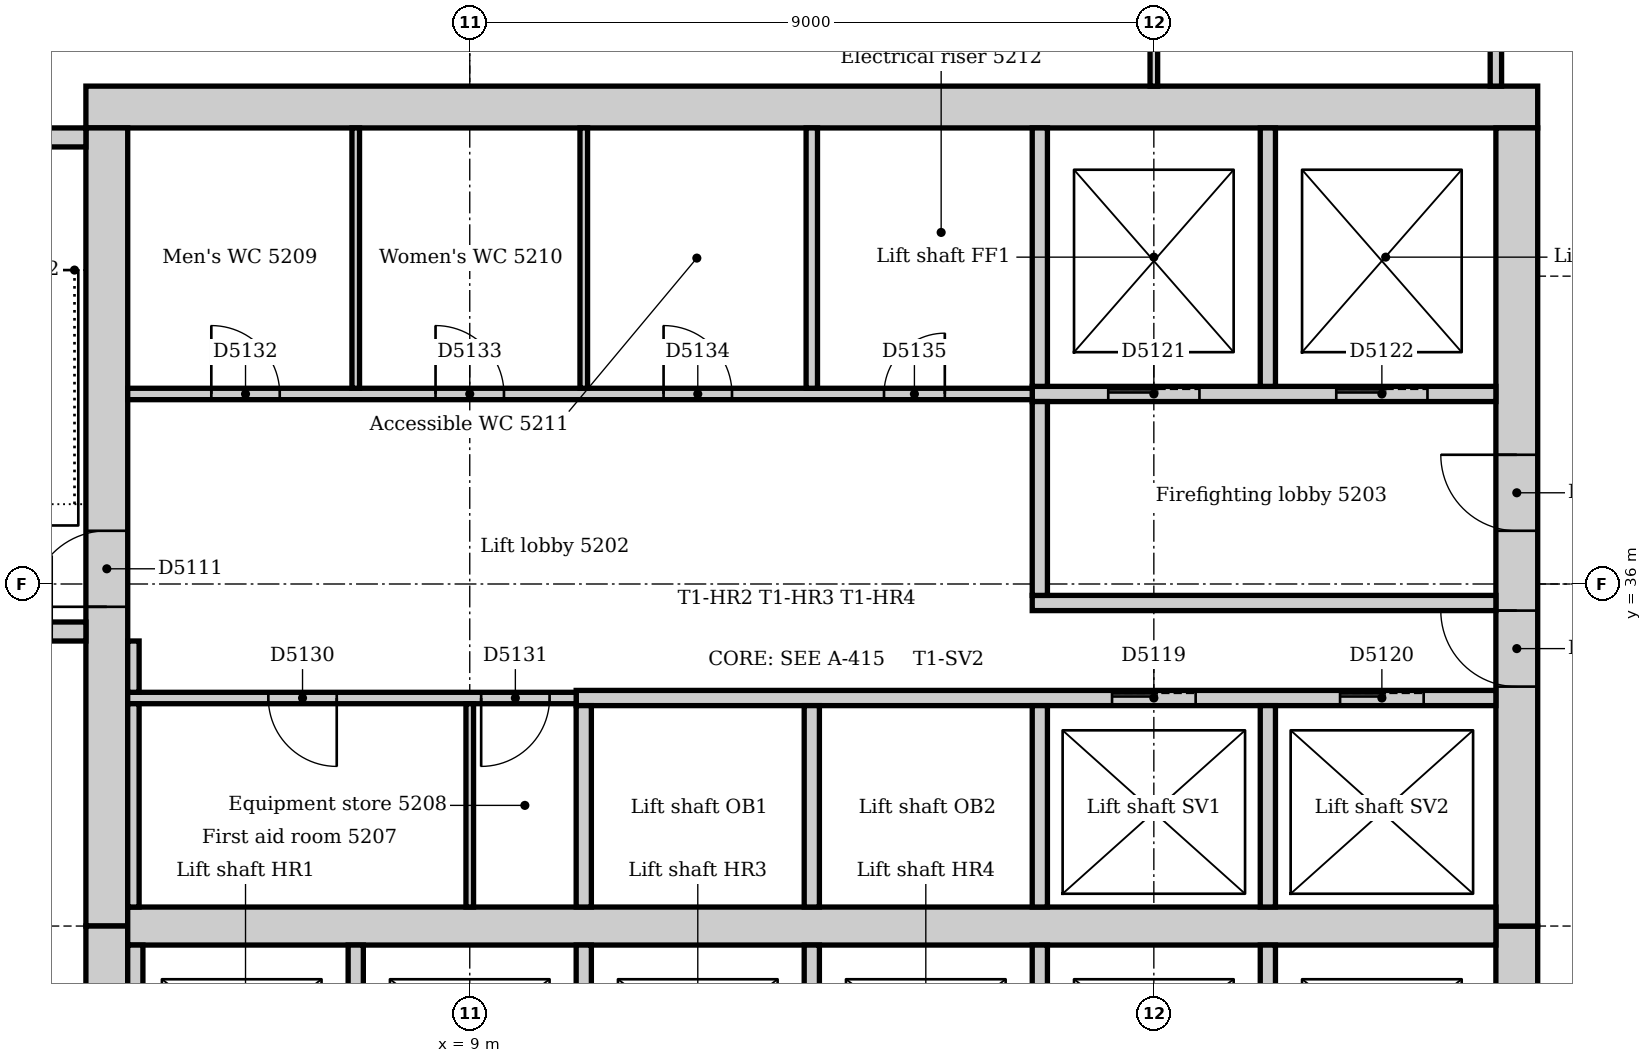
"""IFC4 building model, lengths in metres.
Left out: names, types, materials, properties, quantities, classifications, styles, units other than length and angle.
Written with IfcOpenShell. Run it as: python <this file> out.ifc"""

import sys

from ifc_helpers import new_model, si_unit, direction, frame, frame_2d, origin, place, context, subcontext, project, spatial, rectangle, extrude, element, fill, save


model = new_model("IFC4")
c1 = context("Model", 3, precision=1e-05, world=origin(), true_north=direction((0.0, 1.0)))
c2 = subcontext(c1, "Body", "Model", "MODEL_VIEW")
j1 = project(units=[si_unit("LENGTHUNIT", "METRE"), si_unit("PLANEANGLEUNIT", "RADIAN")], contexts=[c1])
p1 = place(None, origin())
s1 = spatial("IfcSite", under=j1, at=p1, CompositionType="ELEMENT")
p2 = place(p1, origin())
s2 = spatial("IfcBuilding", under=s1, at=p2, CompositionType="ELEMENT")
p3 = place(p2, frame((0.0, 0.0, 218.0)))
s3 = spatial("IfcBuildingStorey", under=s2, at=p3, CompositionType="ELEMENT", Elevation=218.0)
p4 = place(p3, frame((23.05, 42.275, 0.0), z_axis=(0.0, 0.0, 1.0), x_axis=(-1.0, 0.0, 0.0)))
e1 = element("IfcWall", 1, at=p4, inside=s3, PredefinedType="SOLIDWALL", context=c2, shape_type="SweptSolid", body=[
    extrude(rectangle(XDim=19.1, YDim=0.55, at=frame_2d((9.55, 0.0))), origin(), (0.0, 0.0, 1.0), 4.0),
])
p5 = place(p3, frame((22.775, 21.0, 0.0), z_axis=(0.0, 0.0, 1.0), x_axis=(0.0, 1.0, 0.0)))
e2 = element("IfcWall", 2, at=p5, inside=s3, PredefinedType="SOLIDWALL", context=c2, shape_type="SweptSolid", body=[
    extrude(rectangle(XDim=10.5, YDim=0.55, at=frame_2d((5.25, 0.0))), origin(), (0.0, 0.0, 1.0), 4.0),
])
p6 = place(p5, frame((4.35, 0.0, 0.0)))
e3 = element("IfcOpeningElement", 3, at=p6, cuts=e2, PredefinedType="OPENING", context=c2, shape_type="SweptSolid", body=[
    extrude(rectangle(XDim=1.8, YDim=2.1, at=frame_2d((0.9, 1.05))), frame((0.0, 0.285, 0.0), z_axis=(0.0, -1.0, 0.0), x_axis=(1.0, 0.0, 0.0)), (0.0, 0.0, 1.0), 0.57),
])
p7 = place(p3, frame((22.775, 31.5, 0.0), z_axis=(0.0, 0.0, 1.0), x_axis=(0.0, 1.0, 0.0)))
e4 = element("IfcWall", 4, at=p7, inside=s3, PredefinedType="SOLIDWALL", context=c2, shape_type="SweptSolid", body=[
    extrude(rectangle(XDim=10.5, YDim=0.55, at=frame_2d((5.25, 0.0))), origin(), (0.0, 0.0, 1.0), 4.0),
])
p8 = place(p7, frame((3.15, 0.0, 0.0)))
e5 = element("IfcOpeningElement", 5, at=p8, cuts=e4, PredefinedType="OPENING", context=c2, shape_type="SweptSolid", body=[
    extrude(rectangle(XDim=1.0, YDim=2.1, at=frame_2d((0.5, 1.05))), frame((0.0, 0.285, 0.0), z_axis=(0.0, -1.0, 0.0), x_axis=(1.0, 0.0, 0.0)), (0.0, 0.0, 1.0), 0.57),
])
p9 = place(p7, frame((5.2, 0.0, 0.0)))
e6 = element("IfcOpeningElement", 6, at=p9, cuts=e4, PredefinedType="OPENING", context=c2, shape_type="SweptSolid", body=[
    extrude(rectangle(XDim=1.0, YDim=2.1, at=frame_2d((0.5, 1.05))), frame((0.0, 0.285, 0.0), z_axis=(0.0, -1.0, 0.0), x_axis=(1.0, 0.0, 0.0)), (0.0, 0.0, 1.0), 0.57),
])
p10 = place(p3, frame((4.225, 42.0, 0.0), z_axis=(0.0, 0.0, 1.0), x_axis=(0.0, -1.0, 0.0)))
e7 = element("IfcWall", 7, at=p10, inside=s3, PredefinedType="SOLIDWALL", context=c2, shape_type="SweptSolid", body=[
    extrude(rectangle(XDim=10.5, YDim=0.55, at=frame_2d((5.25, 0.0))), origin(), (0.0, 0.0, 1.0), 4.0),
])
p11 = place(p10, frame((5.3, 0.0, 0.0)))
e8 = element("IfcOpeningElement", 8, at=p11, cuts=e7, PredefinedType="OPENING", context=c2, shape_type="SweptSolid", body=[
    extrude(rectangle(XDim=1.0, YDim=2.1, at=frame_2d((0.5, 1.05))), frame((0.0, 0.285, 0.0), z_axis=(0.0, -1.0, 0.0), x_axis=(1.0, 0.0, 0.0)), (0.0, 0.0, 1.0), 0.57),
])
p12 = place(p3, frame((4.225, 31.5, 0.0), z_axis=(0.0, 0.0, 1.0), x_axis=(0.0, -1.0, 0.0)))
e9 = element("IfcWall", 9, at=p12, inside=s3, PredefinedType="SOLIDWALL", context=c2, shape_type="SweptSolid", body=[
    extrude(rectangle(XDim=10.5, YDim=0.55, at=frame_2d((5.25, 0.0))), origin(), (0.0, 0.0, 1.0), 4.0),
])
p13 = place(p12, frame((4.25, 0.0, 0.0)))
e10 = element("IfcOpeningElement", 10, at=p13, cuts=e9, PredefinedType="OPENING", context=c2, shape_type="SweptSolid", body=[
    extrude(rectangle(XDim=1.0, YDim=2.1, at=frame_2d((0.5, 1.05))), frame((0.0, 0.285, 0.0), z_axis=(0.0, -1.0, 0.0), x_axis=(1.0, 0.0, 0.0)), (0.0, 0.0, 1.0), 0.57),
])
p14 = place(p3, frame((4.5, 31.5, 0.0), z_axis=(0.0, 0.0, 1.0), x_axis=(1.0, 0.0, 0.0)))
e11 = element("IfcWall", 11, at=p14, inside=s3, PredefinedType="SOLIDWALL", context=c2, shape_type="SweptSolid", body=[
    extrude(rectangle(XDim=18.0, YDim=0.5, at=frame_2d((9.0, 0.0))), origin(), (0.0, 0.0, 1.0), 4.0),
])
p15 = place(p3, frame((0.36, 35.375, 0.0), z_axis=(0.0, 0.0, 1.0), x_axis=(1.0, 0.0, 0.0)))
e12 = element("IfcWall", 12, at=p15, inside=s3, PredefinedType="SOLIDWALL", context=c2, shape_type="SweptSolid", body=[
    extrude(rectangle(XDim=3.59, YDim=0.25, at=frame_2d((1.795, 0.0))), origin(), (0.0, 0.0, 1.0), 4.0),
])
p16 = place(p15, frame((2.14, 0.0, 0.0)))
e13 = element("IfcOpeningElement", 13, at=p16, cuts=e12, PredefinedType="OPENING", context=c2, shape_type="SweptSolid", body=[
    extrude(rectangle(XDim=1.0, YDim=2.1, at=frame_2d((0.5, 1.05))), frame((0.0, 0.135, 0.0), z_axis=(0.0, -1.0, 0.0), x_axis=(1.0, 0.0, 0.0)), (0.0, 0.0, 1.0), 0.27),
])
p17 = place(p3, frame((3.95, 41.875, 0.0), z_axis=(0.0, 0.0, 1.0), x_axis=(-1.0, 0.0, 0.0)))
e14 = element("IfcWall", 14, at=p17, inside=s3, PredefinedType="SOLIDWALL", context=c2, shape_type="SweptSolid", body=[
    extrude(rectangle(XDim=3.59, YDim=0.25, at=frame_2d((1.795, 0.0))), origin(), (0.0, 0.0, 1.0), 4.0),
])
p18 = place(p3, frame((16.4, 35.75, 0.0), z_axis=(0.0, 0.0, 1.0), x_axis=(1.0, 0.0, 0.0)))
e15 = element("IfcWall", 15, at=p18, inside=s3, PredefinedType="PARTITIONING", context=c2, shape_type="SweptSolid", body=[
    extrude(rectangle(XDim=6.1, YDim=0.2, at=frame_2d((3.05, 0.0))), origin(), (0.0, 0.0, 1.0), 3.85),
])
p19 = place(p3, frame((16.4, 38.5, 0.0), z_axis=(0.0, 0.0, 1.0), x_axis=(1.0, 0.0, 0.0)))
e16 = element("IfcWall", 16, at=p19, inside=s3, PredefinedType="PARTITIONING", context=c2, shape_type="SweptSolid", body=[
    extrude(rectangle(XDim=6.1, YDim=0.2, at=frame_2d((3.05, 0.0))), origin(), (0.0, 0.0, 1.0), 3.85),
])
p20 = place(p19, frame((1.0, 0.0, 0.0)))
e17 = element("IfcOpeningElement", 17, at=p20, cuts=e16, PredefinedType="OPENING", context=c2, shape_type="SweptSolid", body=[
    extrude(rectangle(XDim=1.2, YDim=2.1, at=frame_2d((0.6, 1.05))), frame((0.0, 0.11, 0.0), z_axis=(0.0, -1.0, 0.0), x_axis=(1.0, 0.0, 0.0)), (0.0, 0.0, 1.0), 0.22),
])
p21 = place(p19, frame((4.0, 0.0, 0.0)))
e18 = element("IfcOpeningElement", 18, at=p21, cuts=e16, PredefinedType="OPENING", context=c2, shape_type="SweptSolid", body=[
    extrude(rectangle(XDim=1.2, YDim=2.1, at=frame_2d((0.6, 1.05))), frame((0.0, 0.11, 0.0), z_axis=(0.0, -1.0, 0.0), x_axis=(1.0, 0.0, 0.0)), (0.0, 0.0, 1.0), 0.22),
])
p22 = place(p3, frame((16.5, 35.85, 0.0), z_axis=(0.0, 0.0, 1.0), x_axis=(0.0, 1.0, 0.0)))
e19 = element("IfcWall", 19, at=p22, inside=s3, PredefinedType="PARTITIONING", context=c2, shape_type="SweptSolid", body=[
    extrude(rectangle(XDim=2.55, YDim=0.2, at=frame_2d((1.275, 0.0))), origin(), (0.0, 0.0, 1.0), 3.85),
])
p23 = place(p3, frame((10.4, 34.5, 0.0), z_axis=(0.0, 0.0, 1.0), x_axis=(1.0, 0.0, 0.0)))
e20 = element("IfcWall", 20, at=p23, inside=s3, PredefinedType="PARTITIONING", context=c2, shape_type="SweptSolid", body=[
    extrude(rectangle(XDim=12.1, YDim=0.2, at=frame_2d((6.05, 0.0))), origin(), (0.0, 0.0, 1.0), 3.85),
])
p24 = place(p23, frame((7.05, 0.0, 0.0)))
e21 = element("IfcOpeningElement", 21, at=p24, cuts=e20, PredefinedType="OPENING", context=c2, shape_type="SweptSolid", body=[
    extrude(rectangle(XDim=1.1, YDim=2.1, at=frame_2d((0.55, 1.05))), frame((0.0, 0.11, 0.0), z_axis=(0.0, -1.0, 0.0), x_axis=(1.0, 0.0, 0.0)), (0.0, 0.0, 1.0), 0.22),
])
p25 = place(p23, frame((10.05, 0.0, 0.0)))
e22 = element("IfcOpeningElement", 22, at=p25, cuts=e20, PredefinedType="OPENING", context=c2, shape_type="SweptSolid", body=[
    extrude(rectangle(XDim=1.1, YDim=2.1, at=frame_2d((0.55, 1.05))), frame((0.0, 0.11, 0.0), z_axis=(0.0, -1.0, 0.0), x_axis=(1.0, 0.0, 0.0)), (0.0, 0.0, 1.0), 0.22),
])
for number, where, z_axis, x_axis in (
    (23, (10.5, 28.6, 0.0), (0.0, 0.0, 1.0), (0.0, 1.0, 0.0)),
    (24, (10.5, 31.75, 0.0), (0.0, 0.0, 1.0), (0.0, 1.0, 0.0)),
    (25, (13.5, 28.6, 0.0), (0.0, 0.0, 1.0), (0.0, 1.0, 0.0)),
    (26, (13.5, 31.75, 0.0), (0.0, 0.0, 1.0), (0.0, 1.0, 0.0)),
    (27, (16.5, 28.6, 0.0), (0.0, 0.0, 1.0), (0.0, 1.0, 0.0)),
    (28, (16.5, 31.75, 0.0), (0.0, 0.0, 1.0), (0.0, 1.0, 0.0)),
    (29, (19.5, 28.6, 0.0), (0.0, 0.0, 1.0), (0.0, 1.0, 0.0)),
    (30, (19.5, 31.75, 0.0), (0.0, 0.0, 1.0), (0.0, 1.0, 0.0)),
):
    element("IfcWall", number, at=place(p3, frame(where, z_axis=z_axis, x_axis=x_axis)), inside=s3, PredefinedType="PARTITIONING", context=c2, shape_type="SweptSolid", body=[
        extrude(rectangle(XDim=2.65, YDim=0.2, at=frame_2d((1.325, 0.0))), origin(), (0.0, 0.0, 1.0), 3.85),
    ])
for number, where, z_axis, x_axis in (
    (31, (16.5, 38.6, 0.0), (0.0, 0.0, 1.0), (0.0, 1.0, 0.0)),
    (32, (19.5, 38.6, 0.0), (0.0, 0.0, 1.0), (0.0, 1.0, 0.0)),
):
    element("IfcWall", number, at=place(p3, frame(where, z_axis=z_axis, x_axis=x_axis)), inside=s3, PredefinedType="PARTITIONING", context=c2, shape_type="SweptSolid", body=[
        extrude(rectangle(XDim=3.4, YDim=0.2, at=frame_2d((1.7, 0.0))), origin(), (0.0, 0.0, 1.0), 3.85),
    ])
for number, where, z_axis, x_axis in (
    (33, (4.6, 28.6, 0.0), (0.0, 0.0, 1.0), (0.0, 1.0, 0.0)),
    (34, (7.5, 28.6, 0.0), (0.0, 0.0, 1.0), (0.0, 1.0, 0.0)),
):
    element("IfcWall", number, at=place(p3, frame(where, z_axis=z_axis, x_axis=x_axis)), inside=s3, PredefinedType="PARTITIONING", context=c2, shape_type="SweptSolid", body=[
        extrude(rectangle(XDim=2.65, YDim=0.2, at=frame_2d((1.325, 0.0))), origin(), (0.0, 0.0, 1.0), 3.85),
    ])
p26 = place(p3, frame((4.5, 38.5, 0.0), z_axis=(0.0, 0.0, 1.0), x_axis=(1.0, 0.0, 0.0)))
e35 = element("IfcWall", 35, at=p26, inside=s3, PredefinedType="PARTITIONING", context=c2, shape_type="SweptSolid", body=[
    extrude(rectangle(XDim=11.9, YDim=0.15, at=frame_2d((5.95, 0.0))), origin(), (0.0, 0.0, 1.0), 3.85),
])
p27 = place(p26, frame((1.1, 0.0, 0.0)))
e36 = element("IfcOpeningElement", 36, at=p27, cuts=e35, PredefinedType="OPENING", context=c2, shape_type="SweptSolid", body=[
    extrude(rectangle(XDim=0.9, YDim=2.1, at=frame_2d((0.45, 1.05))), frame((0.0, 0.085, 0.0), z_axis=(0.0, -1.0, 0.0), x_axis=(1.0, 0.0, 0.0)), (0.0, 0.0, 1.0), 0.17),
])
p28 = place(p26, frame((4.05, 0.0, 0.0)))
e37 = element("IfcOpeningElement", 37, at=p28, cuts=e35, PredefinedType="OPENING", context=c2, shape_type="SweptSolid", body=[
    extrude(rectangle(XDim=0.9, YDim=2.1, at=frame_2d((0.45, 1.05))), frame((0.0, 0.085, 0.0), z_axis=(0.0, -1.0, 0.0), x_axis=(1.0, 0.0, 0.0)), (0.0, 0.0, 1.0), 0.17),
])
p29 = place(p26, frame((7.05, 0.0, 0.0)))
e38 = element("IfcOpeningElement", 38, at=p29, cuts=e35, PredefinedType="OPENING", context=c2, shape_type="SweptSolid", body=[
    extrude(rectangle(XDim=0.9, YDim=2.1, at=frame_2d((0.45, 1.05))), frame((0.0, 0.085, 0.0), z_axis=(0.0, -1.0, 0.0), x_axis=(1.0, 0.0, 0.0)), (0.0, 0.0, 1.0), 0.17),
])
p30 = place(p26, frame((9.95, 0.0, 0.0)))
e39 = element("IfcOpeningElement", 39, at=p30, cuts=e35, PredefinedType="OPENING", context=c2, shape_type="SweptSolid", body=[
    extrude(rectangle(XDim=0.8, YDim=2.1, at=frame_2d((0.4, 1.05))), frame((0.0, 0.085, 0.0), z_axis=(0.0, -1.0, 0.0), x_axis=(1.0, 0.0, 0.0)), (0.0, 0.0, 1.0), 0.17),
])
p31 = place(p3, frame((4.5, 34.5, 0.0), z_axis=(0.0, 0.0, 1.0), x_axis=(1.0, 0.0, 0.0)))
e40 = element("IfcWall", 40, at=p31, inside=s3, PredefinedType="PARTITIONING", context=c2, shape_type="SweptSolid", body=[
    extrude(rectangle(XDim=5.9, YDim=0.15, at=frame_2d((2.95, 0.0))), origin(), (0.0, 0.0, 1.0), 3.85),
])
p32 = place(p31, frame((1.85, 0.0, 0.0)))
e41 = element("IfcOpeningElement", 41, at=p32, cuts=e40, PredefinedType="OPENING", context=c2, shape_type="SweptSolid", body=[
    extrude(rectangle(XDim=0.9, YDim=2.1, at=frame_2d((0.45, 1.05))), frame((0.0, 0.085, 0.0), z_axis=(0.0, -1.0, 0.0), x_axis=(1.0, 0.0, 0.0)), (0.0, 0.0, 1.0), 0.17),
])
p33 = place(p31, frame((4.65, 0.0, 0.0)))
e42 = element("IfcOpeningElement", 42, at=p33, cuts=e40, PredefinedType="OPENING", context=c2, shape_type="SweptSolid", body=[
    extrude(rectangle(XDim=0.9, YDim=2.1, at=frame_2d((0.45, 1.05))), frame((0.0, 0.085, 0.0), z_axis=(0.0, -1.0, 0.0), x_axis=(1.0, 0.0, 0.0)), (0.0, 0.0, 1.0), 0.17),
])
p34 = place(p3, frame((4.575, 34.575, 0.0), z_axis=(0.0, 0.0, 1.0), x_axis=(0.0, 1.0, 0.0)))
e43 = element("IfcWall", 43, at=p34, inside=s3, PredefinedType="PARTITIONING", context=c2, shape_type="SweptSolid", body=[
    extrude(rectangle(XDim=0.675, YDim=0.15, at=frame_2d((0.338, 0.0))), origin(), (0.0, 0.0, 1.0), 3.85),
])
p35 = place(p3, frame((4.575, 31.75, 0.0), z_axis=(0.0, 0.0, 1.0), x_axis=(0.0, 1.0, 0.0)))
e44 = element("IfcWall", 44, at=p35, inside=s3, PredefinedType="PARTITIONING", context=c2, shape_type="SweptSolid", body=[
    extrude(rectangle(XDim=2.675, YDim=0.15, at=frame_2d((1.337, 0.0))), origin(), (0.0, 0.0, 1.0), 3.85),
])
p36 = place(p3, frame((22.5, 42.55, 0.0), z_axis=(0.0, 0.0, 1.0), x_axis=(0.0, 1.0, 0.0)))
e45 = element("IfcWall", 45, at=p36, inside=s3, PredefinedType="PARTITIONING", context=c2, shape_type="SweptSolid", body=[
    extrude(rectangle(XDim=2.375, YDim=0.15, at=frame_2d((1.188, 0.0))), origin(), (0.0, 0.0, 1.0), 3.85),
])
p37 = place(p3, frame((13.5, 38.575, 0.0), z_axis=(0.0, 0.0, 1.0), x_axis=(0.0, 1.0, 0.0)))
e46 = element("IfcWall", 46, at=p37, inside=s3, PredefinedType="PARTITIONING", context=c2, shape_type="SweptSolid", body=[
    extrude(rectangle(XDim=3.425, YDim=0.15, at=frame_2d((1.712, 0.0))), origin(), (0.0, 0.0, 1.0), 3.85),
])
p38 = place(p3, frame((18.0, 42.55, 0.0), z_axis=(0.0, 0.0, 1.0), x_axis=(0.0, 1.0, 0.0)))
e47 = element("IfcWall", 47, at=p38, inside=s3, PredefinedType="PARTITIONING", context=c2, shape_type="SweptSolid", body=[
    extrude(rectangle(XDim=1.15, YDim=0.1, at=frame_2d((0.575, 0.0))), origin(), (0.0, 0.0, 1.0), 3.652),
])
for number, where, z_axis, x_axis in (
    (48, (7.5, 38.575, 0.0), (0.0, 0.0, 1.0), (0.0, 1.0, 0.0)),
    (49, (10.5, 38.575, 0.0), (0.0, 0.0, 1.0), (0.0, 1.0, 0.0)),
):
    element("IfcWall", number, at=place(p3, frame(where, z_axis=z_axis, x_axis=x_axis)), inside=s3, PredefinedType="PARTITIONING", context=c2, shape_type="SweptSolid", body=[
        extrude(rectangle(XDim=3.425, YDim=0.1, at=frame_2d((1.712, 0.0))), origin(), (0.0, 0.0, 1.0), 3.85),
    ])
p39 = place(p3, frame((9.0, 31.75, 0.0), z_axis=(0.0, 0.0, 1.0), x_axis=(0.0, 1.0, 0.0)))
e50 = element("IfcWall", 50, at=p39, inside=s3, PredefinedType="PARTITIONING", context=c2, shape_type="SweptSolid", body=[
    extrude(rectangle(XDim=2.675, YDim=0.1, at=frame_2d((1.337, 0.0))), origin(), (0.0, 0.0, 1.0), 3.85),
])
p40 = place(p11, frame((1.0, 0.0, 0.0), z_axis=(0.0, 0.0, 1.0), x_axis=(-1.0, 0.0, 0.0)))
e51 = element("IfcDoor", 51, at=p40, inside=s3, OperationType="SINGLE_SWING_LEFT", PredefinedType="DOOR", context=c2, shape_type="SweptSolid", body=[
    extrude(rectangle(XDim=1.0, YDim=2.1, at=frame_2d((0.5, 1.05))), frame((0.0, 0.025, 0.0), z_axis=(0.0, -1.0, 0.0), x_axis=(1.0, 0.0, 0.0)), (0.0, 0.0, 1.0), 0.05),
])
fill(e8, e51)
p41 = place(p24, origin())
e52 = element("IfcDoor", 52, at=p41, inside=s3, OperationType="SLIDING_TO_LEFT", PredefinedType="DOOR", context=c2, shape_type="SweptSolid", body=[
    extrude(rectangle(XDim=1.1, YDim=2.1, at=frame_2d((0.55, 1.05))), frame((0.0, 0.025, 0.0), z_axis=(0.0, -1.0, 0.0), x_axis=(1.0, 0.0, 0.0)), (0.0, 0.0, 1.0), 0.05),
])
fill(e21, e52)
p42 = place(p25, origin())
e53 = element("IfcDoor", 53, at=p42, inside=s3, OperationType="SLIDING_TO_LEFT", PredefinedType="DOOR", context=c2, shape_type="SweptSolid", body=[
    extrude(rectangle(XDim=1.1, YDim=2.1, at=frame_2d((0.55, 1.05))), frame((0.0, 0.025, 0.0), z_axis=(0.0, -1.0, 0.0), x_axis=(1.0, 0.0, 0.0)), (0.0, 0.0, 1.0), 0.05),
])
fill(e22, e53)
p43 = place(p20, origin())
e54 = element("IfcDoor", 54, at=p43, inside=s3, OperationType="SLIDING_TO_LEFT", PredefinedType="DOOR", context=c2, shape_type="SweptSolid", body=[
    extrude(rectangle(XDim=1.2, YDim=2.1, at=frame_2d((0.6, 1.05))), frame((0.0, 0.025, 0.0), z_axis=(0.0, -1.0, 0.0), x_axis=(1.0, 0.0, 0.0)), (0.0, 0.0, 1.0), 0.05),
])
fill(e17, e54)
p44 = place(p21, origin())
e55 = element("IfcDoor", 55, at=p44, inside=s3, OperationType="SLIDING_TO_LEFT", PredefinedType="DOOR", context=c2, shape_type="SweptSolid", body=[
    extrude(rectangle(XDim=1.2, YDim=2.1, at=frame_2d((0.6, 1.05))), frame((0.0, 0.025, 0.0), z_axis=(0.0, -1.0, 0.0), x_axis=(1.0, 0.0, 0.0)), (0.0, 0.0, 1.0), 0.05),
])
fill(e18, e55)
p45 = place(p8, origin())
e56 = element("IfcDoor", 56, at=p45, inside=s3, OperationType="SINGLE_SWING_RIGHT", PredefinedType="DOOR", context=c2, shape_type="SweptSolid", body=[
    extrude(rectangle(XDim=1.0, YDim=2.1, at=frame_2d((0.5, 1.05))), frame((0.0, 0.025, 0.0), z_axis=(0.0, -1.0, 0.0), x_axis=(1.0, 0.0, 0.0)), (0.0, 0.0, 1.0), 0.05),
])
fill(e5, e56)
p46 = place(p9, origin())
e57 = element("IfcDoor", 57, at=p46, inside=s3, OperationType="SINGLE_SWING_RIGHT", PredefinedType="DOOR", context=c2, shape_type="SweptSolid", body=[
    extrude(rectangle(XDim=1.0, YDim=2.1, at=frame_2d((0.5, 1.05))), frame((0.0, 0.025, 0.0), z_axis=(0.0, -1.0, 0.0), x_axis=(1.0, 0.0, 0.0)), (0.0, 0.0, 1.0), 0.05),
])
fill(e6, e57)
p47 = place(p32, frame((0.9, 0.0, 0.0), z_axis=(0.0, 0.0, 1.0), x_axis=(-1.0, 0.0, 0.0)))
e58 = element("IfcDoor", 58, at=p47, inside=s3, OperationType="SINGLE_SWING_LEFT", PredefinedType="DOOR", context=c2, shape_type="SweptSolid", body=[
    extrude(rectangle(XDim=0.9, YDim=2.1, at=frame_2d((0.45, 1.05))), frame((0.0, 0.025, 0.0), z_axis=(0.0, -1.0, 0.0), x_axis=(1.0, 0.0, 0.0)), (0.0, 0.0, 1.0), 0.05),
])
fill(e41, e58)
p48 = place(p33, frame((0.9, 0.0, 0.0), z_axis=(0.0, 0.0, 1.0), x_axis=(-1.0, 0.0, 0.0)))
e59 = element("IfcDoor", 59, at=p48, inside=s3, OperationType="SINGLE_SWING_RIGHT", PredefinedType="DOOR", context=c2, shape_type="SweptSolid", body=[
    extrude(rectangle(XDim=0.9, YDim=2.1, at=frame_2d((0.45, 1.05))), frame((0.0, 0.025, 0.0), z_axis=(0.0, -1.0, 0.0), x_axis=(1.0, 0.0, 0.0)), (0.0, 0.0, 1.0), 0.05),
])
fill(e42, e59)
p49 = place(p27, origin())
e60 = element("IfcDoor", 60, at=p49, inside=s3, OperationType="SINGLE_SWING_LEFT", PredefinedType="DOOR", context=c2, shape_type="SweptSolid", body=[
    extrude(rectangle(XDim=0.9, YDim=2.1, at=frame_2d((0.45, 1.05))), frame((0.0, 0.025, 0.0), z_axis=(0.0, -1.0, 0.0), x_axis=(1.0, 0.0, 0.0)), (0.0, 0.0, 1.0), 0.05),
])
fill(e36, e60)
p50 = place(p28, origin())
e61 = element("IfcDoor", 61, at=p50, inside=s3, OperationType="SINGLE_SWING_LEFT", PredefinedType="DOOR", context=c2, shape_type="SweptSolid", body=[
    extrude(rectangle(XDim=0.9, YDim=2.1, at=frame_2d((0.45, 1.05))), frame((0.0, 0.025, 0.0), z_axis=(0.0, -1.0, 0.0), x_axis=(1.0, 0.0, 0.0)), (0.0, 0.0, 1.0), 0.05),
])
fill(e37, e61)
p51 = place(p29, origin())
e62 = element("IfcDoor", 62, at=p51, inside=s3, OperationType="SINGLE_SWING_LEFT", PredefinedType="DOOR", context=c2, shape_type="SweptSolid", body=[
    extrude(rectangle(XDim=0.9, YDim=2.1, at=frame_2d((0.45, 1.05))), frame((0.0, 0.025, 0.0), z_axis=(0.0, -1.0, 0.0), x_axis=(1.0, 0.0, 0.0)), (0.0, 0.0, 1.0), 0.05),
])
fill(e38, e62)
p52 = place(p30, origin())
e63 = element("IfcDoor", 63, at=p52, inside=s3, OperationType="SINGLE_SWING_RIGHT", PredefinedType="DOOR", context=c2, shape_type="SweptSolid", body=[
    extrude(rectangle(XDim=0.8, YDim=2.1, at=frame_2d((0.4, 1.05))), frame((0.0, 0.025, 0.0), z_axis=(0.0, -1.0, 0.0), x_axis=(1.0, 0.0, 0.0)), (0.0, 0.0, 1.0), 0.05),
])
fill(e39, e63)
save(model, sys.argv[1])
